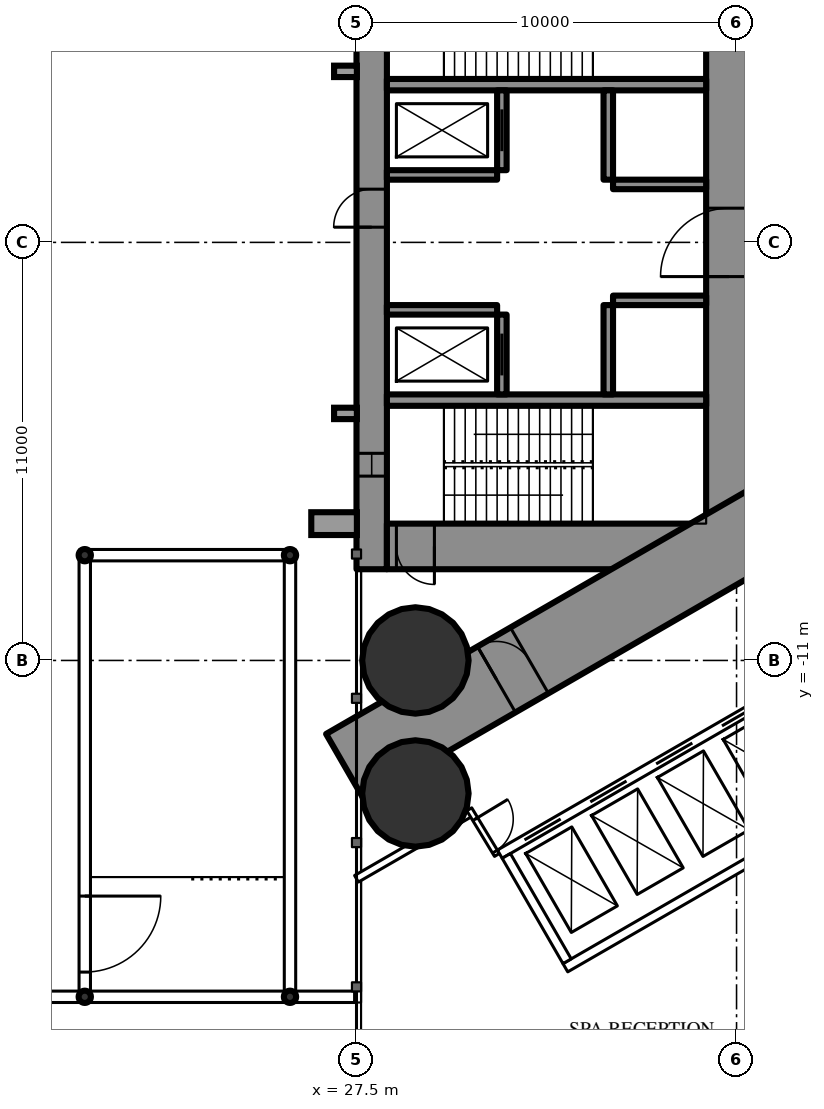
"""IFC4 building model, lengths in metres.
Left out: names, types, materials, properties, quantities, classifications, styles, units other than length and angle.
Written with IfcOpenShell. Run it as: python <this file> out.ifc"""

import sys

from ifc_helpers import new_model, si_unit, direction, frame, frame_2d, origin, origin_2d, place, context, subcontext, project, spatial, rectangle, hollow_circle, extrude, element, fill, save


model = new_model("IFC4")
c1 = context("Model", 3, precision=1e-05, world=origin(), true_north=direction((0.0, 1.0)))
c2 = subcontext(c1, "Body", "Model", "MODEL_VIEW")
j1 = project(units=[si_unit("LENGTHUNIT", "METRE"), si_unit("PLANEANGLEUNIT", "RADIAN")], contexts=[c1])
p1 = place(None, origin())
s1 = spatial("IfcSite", under=j1, at=p1, CompositionType="ELEMENT")
p2 = place(p1, origin())
s2 = spatial("IfcBuilding", under=s1, at=p2, CompositionType="ELEMENT")
p3 = place(p2, frame((0.0, 0.0, 12.6)))
s3 = spatial("IfcBuildingStorey", under=s2, at=p3, CompositionType="ELEMENT", Elevation=12.6)
for number, where, z_axis, x_axis in (
    (1, (29.05, -11.0, 0.0), (0.0, 0.0, 1.0), (1.0, 0.0, 0.0)),
    (2, (29.05, -14.5, 0.0), (0.0, 0.0, 1.0), (1.0, 0.0, 0.0)),
):
    element("IfcColumn", number, at=place(p3, frame(where, z_axis=z_axis, x_axis=x_axis)), inside=s3, PredefinedType="COLUMN", context=c2, shape_type="SweptSolid", body=[
        extrude(hollow_circle(Radius=1.4, WallThickness=0.12, at=origin_2d()), origin(), (0.0, 0.0, 1.0), 5.4),
    ])
p4 = place(p3, frame((27.9, -8.6, 0.0), z_axis=(0.0, 0.0, 1.0), x_axis=(0.0, 1.0, 0.0)))
e3 = element("IfcWall", 3, at=p4, inside=s3, PredefinedType="SHEAR", context=c2, shape_type="SweptSolid", body=[
    extrude(rectangle(XDim=17.2, YDim=0.8, at=frame_2d((8.6, 0.0))), origin(), (0.0, 0.0, 1.0), 5.4),
])
p5 = place(p4, frame((9.0, 0.0, 0.0)))
e4 = element("IfcOpeningElement", 4, at=p5, cuts=e3, PredefinedType="OPENING", context=c2, shape_type="SweptSolid", body=[
    extrude(rectangle(XDim=1.0, YDim=2.2, at=frame_2d((0.5, 1.1))), frame((0.0, 0.41, 0.0), z_axis=(0.0, -1.0, 0.0), x_axis=(1.0, 0.0, 0.0)), (0.0, 0.0, 1.0), 0.82),
])
p6 = place(p4, frame((2.45, 0.0, 0.6)))
e5 = element("IfcOpeningElement", 5, at=p6, cuts=e3, PredefinedType="OPENING", context=c2, shape_type="SweptSolid", body=[
    extrude(rectangle(XDim=0.6, YDim=3.9, at=frame_2d((0.3, 1.95))), frame((0.0, 0.41, 0.0), z_axis=(0.0, -1.0, 0.0), x_axis=(1.0, 0.0, 0.0)), (0.0, 0.0, 1.0), 0.82),
])
p7 = place(p4, frame((14.15, 0.0, 0.6)))
e6 = element("IfcOpeningElement", 6, at=p7, cuts=e3, PredefinedType="OPENING", context=c2, shape_type="SweptSolid", body=[
    extrude(rectangle(XDim=0.6, YDim=3.9, at=frame_2d((0.3, 1.95))), frame((0.0, 0.41, 0.0), z_axis=(0.0, -1.0, 0.0), x_axis=(1.0, 0.0, 0.0)), (0.0, 0.0, 1.0), 0.82),
])
p8 = place(p3, frame((37.3, -8.6, 0.0), z_axis=(0.0, 0.0, 1.0), x_axis=(0.0, 1.0, 0.0)))
e7 = element("IfcWall", 7, at=p8, inside=s3, PredefinedType="SHEAR", context=c2, shape_type="SweptSolid", body=[
    extrude(rectangle(XDim=17.2, YDim=1.2, at=frame_2d((8.6, 0.0))), origin(), (0.0, 0.0, 1.0), 5.4),
])
p9 = place(p8, frame((7.7, 0.0, 0.0)))
e8 = element("IfcOpeningElement", 8, at=p9, cuts=e7, PredefinedType="OPENING", context=c2, shape_type="SweptSolid", body=[
    extrude(rectangle(XDim=1.8, YDim=2.2, at=frame_2d((0.9, 1.1))), frame((0.0, 0.61, 0.0), z_axis=(0.0, -1.0, 0.0), x_axis=(1.0, 0.0, 0.0)), (0.0, 0.0, 1.0), 1.22),
])
p10 = place(p3, frame((28.3, -8.0, 0.0), z_axis=(0.0, 0.0, 1.0), x_axis=(1.0, 0.0, 0.0)))
e9 = element("IfcWall", 9, at=p10, inside=s3, PredefinedType="SHEAR", context=c2, shape_type="SweptSolid", body=[
    extrude(rectangle(XDim=8.4, YDim=1.2, at=frame_2d((4.2, 0.0))), origin(), (0.0, 0.0, 1.0), 5.4),
])
p11 = place(p10, frame((0.25, 0.0, 0.0)))
e10 = element("IfcOpeningElement", 10, at=p11, cuts=e9, PredefinedType="OPENING", context=c2, shape_type="SweptSolid", body=[
    extrude(rectangle(XDim=1.0, YDim=2.2, at=frame_2d((0.5, 1.1))), frame((0.0, 0.61, 0.0), z_axis=(0.0, -1.0, 0.0), x_axis=(1.0, 0.0, 0.0)), (0.0, 0.0, 1.0), 1.22),
])
for number, where, z_axis, x_axis in (
    (11, (28.3, -4.15, 0.0), (0.0, 0.0, 1.0), (1.0, 0.0, 0.0)),
    (12, (28.3, 4.15, 0.0), (0.0, 0.0, 1.0), (1.0, 0.0, 0.0)),
):
    element("IfcWall", number, at=place(p3, frame(where, z_axis=z_axis, x_axis=x_axis)), inside=s3, PredefinedType="SHEAR", context=c2, shape_type="SweptSolid", body=[
        extrude(rectangle(XDim=8.4, YDim=0.3, at=frame_2d((4.2, 0.0))), origin(), (0.0, 0.0, 1.0), 5.4),
    ])
p12 = place(p3, frame((31.325, -4.0, 0.0), z_axis=(0.0, 0.0, 1.0), x_axis=(0.0, 1.0, 0.0)))
e13 = element("IfcWall", 13, at=p12, inside=s3, PredefinedType="SHEAR", context=c2, shape_type="SweptSolid", body=[
    extrude(rectangle(XDim=2.1, YDim=0.25, at=frame_2d((1.05, 0.0))), origin(), (0.0, 0.0, 1.0), 5.4),
])
p13 = place(p12, frame((0.5, 0.0, 0.0)))
e14 = element("IfcOpeningElement", 14, at=p13, cuts=e13, PredefinedType="OPENING", context=c2, shape_type="SweptSolid", body=[
    extrude(rectangle(XDim=1.1, YDim=2.2, at=frame_2d((0.55, 1.1))), frame((0.0, 0.135, 0.0), z_axis=(0.0, -1.0, 0.0), x_axis=(1.0, 0.0, 0.0)), (0.0, 0.0, 1.0), 0.27),
])
p14 = place(p3, frame((34.125, -4.0, 0.0), z_axis=(0.0, 0.0, 1.0), x_axis=(0.0, 1.0, 0.0)))
e15 = element("IfcWall", 15, at=p14, inside=s3, PredefinedType="SHEAR", context=c2, shape_type="SweptSolid", body=[
    extrude(rectangle(XDim=2.35, YDim=0.25, at=frame_2d((1.175, 0.0))), origin(), (0.0, 0.0, 1.0), 5.4),
])
p15 = place(p3, frame((28.3, -1.775, 0.0), z_axis=(0.0, 0.0, 1.0), x_axis=(1.0, 0.0, 0.0)))
e16 = element("IfcWall", 16, at=p15, inside=s3, PredefinedType="SHEAR", context=c2, shape_type="SweptSolid", body=[
    extrude(rectangle(XDim=2.9, YDim=0.25, at=frame_2d((1.45, 0.0))), origin(), (0.0, 0.0, 1.0), 5.4),
])
p16 = place(p3, frame((34.25, -1.525, 0.0), z_axis=(0.0, 0.0, 1.0), x_axis=(1.0, 0.0, 0.0)))
e17 = element("IfcWall", 17, at=p16, inside=s3, PredefinedType="SHEAR", context=c2, shape_type="SweptSolid", body=[
    extrude(rectangle(XDim=2.45, YDim=0.25, at=frame_2d((1.225, 0.0))), origin(), (0.0, 0.0, 1.0), 5.4),
])
p17 = place(p3, frame((31.325, 1.9, 0.0), z_axis=(0.0, 0.0, 1.0), x_axis=(0.0, 1.0, 0.0)))
e18 = element("IfcWall", 18, at=p17, inside=s3, PredefinedType="SHEAR", context=c2, shape_type="SweptSolid", body=[
    extrude(rectangle(XDim=2.1, YDim=0.25, at=frame_2d((1.05, 0.0))), origin(), (0.0, 0.0, 1.0), 5.4),
])
p18 = place(p17, frame((0.5, 0.0, 0.0)))
e19 = element("IfcOpeningElement", 19, at=p18, cuts=e18, PredefinedType="OPENING", context=c2, shape_type="SweptSolid", body=[
    extrude(rectangle(XDim=1.1, YDim=2.2, at=frame_2d((0.55, 1.1))), frame((0.0, 0.135, 0.0), z_axis=(0.0, -1.0, 0.0), x_axis=(1.0, 0.0, 0.0)), (0.0, 0.0, 1.0), 0.27),
])
p19 = place(p3, frame((34.125, 1.65, 0.0), z_axis=(0.0, 0.0, 1.0), x_axis=(0.0, 1.0, 0.0)))
e20 = element("IfcWall", 20, at=p19, inside=s3, PredefinedType="SHEAR", context=c2, shape_type="SweptSolid", body=[
    extrude(rectangle(XDim=2.35, YDim=0.25, at=frame_2d((1.175, 0.0))), origin(), (0.0, 0.0, 1.0), 5.4),
])
p20 = place(p3, frame((28.3, 1.775, 0.0), z_axis=(0.0, 0.0, 1.0), x_axis=(1.0, 0.0, 0.0)))
e21 = element("IfcWall", 21, at=p20, inside=s3, PredefinedType="SHEAR", context=c2, shape_type="SweptSolid", body=[
    extrude(rectangle(XDim=2.9, YDim=0.25, at=frame_2d((1.45, 0.0))), origin(), (0.0, 0.0, 1.0), 5.4),
])
p21 = place(p3, frame((34.25, 1.525, 0.0), z_axis=(0.0, 0.0, 1.0), x_axis=(1.0, 0.0, 0.0)))
e22 = element("IfcWall", 22, at=p21, inside=s3, PredefinedType="SHEAR", context=c2, shape_type="SweptSolid", body=[
    extrude(rectangle(XDim=2.45, YDim=0.25, at=frame_2d((1.225, 0.0))), origin(), (0.0, 0.0, 1.0), 5.4),
])
p22 = place(p3, frame((27.2, -13.8, 0.0), z_axis=(0.0, 0.0, 1.0), x_axis=(0.866027159892, 0.499996958321, 0.0)))
e23 = element("IfcWall", 23, at=p22, inside=s3, PredefinedType="SHEAR", context=c2, shape_type="SweptSolid", body=[
    extrude(rectangle(XDim=27.947, YDim=2.0, at=frame_2d((13.973, 0.0))), origin(), (0.0, 0.0, 1.0), 5.4),
])
p23 = place(p22, frame((4.6, 0.0, 0.0)))
e24 = element("IfcOpeningElement", 24, at=p23, cuts=e23, PredefinedType="OPENING", context=c2, shape_type="SweptSolid", body=[
    extrude(rectangle(XDim=1.0, YDim=2.2, at=frame_2d((0.5, 1.1))), frame((0.0, 1.01, 0.0), z_axis=(0.0, -1.0, 0.0), x_axis=(1.0, 0.0, 0.0)), (0.0, 0.0, 1.0), 2.02),
])
p24 = place(p22, frame((13.395, 0.0, 0.0)))
e25 = element("IfcOpeningElement", 25, at=p24, cuts=e23, PredefinedType="OPENING", context=c2, shape_type="SweptSolid", body=[
    extrude(rectangle(XDim=1.8, YDim=2.2, at=frame_2d((0.9, 1.1))), frame((0.0, 1.01, 0.0), z_axis=(0.0, -1.0, 0.0), x_axis=(1.0, 0.0, 0.0)), (0.0, 0.0, 1.0), 2.02),
])
p25 = place(p3, frame((27.2, 13.8, 0.0), z_axis=(0.0, 0.0, 1.0), x_axis=(0.866024545924, -0.500001485854, 0.0)))
e26 = element("IfcWall", 26, at=p25, inside=s3, PredefinedType="SHEAR", context=c2, shape_type="SweptSolid", body=[
    extrude(rectangle(XDim=26.534, YDim=2.0, at=frame_2d((13.267, 0.0))), origin(), (0.0, 0.0, 1.0), 5.4),
])
p26 = place(p25, frame((4.6, 0.0, 0.0)))
e27 = element("IfcOpeningElement", 27, at=p26, cuts=e26, PredefinedType="OPENING", context=c2, shape_type="SweptSolid", body=[
    extrude(rectangle(XDim=1.0, YDim=2.2, at=frame_2d((0.5, 1.1))), frame((0.0, 1.01, 0.0), z_axis=(0.0, -1.0, 0.0), x_axis=(1.0, 0.0, 0.0)), (0.0, 0.0, 1.0), 2.02),
])
p27 = place(p25, frame((13.395, 0.0, 0.0)))
e28 = element("IfcOpeningElement", 28, at=p27, cuts=e26, PredefinedType="OPENING", context=c2, shape_type="SweptSolid", body=[
    extrude(rectangle(XDim=1.8, YDim=2.2, at=frame_2d((0.9, 1.1))), frame((0.0, 1.01, 0.0), z_axis=(0.0, -1.0, 0.0), x_axis=(1.0, 0.0, 0.0)), (0.0, 0.0, 1.0), 2.02),
])
p28 = place(p3, frame((-20.2, -19.85, 0.0), z_axis=(0.0, 0.0, 1.0), x_axis=(1.0, 0.0, 0.0)))
e29 = element("IfcWall", 29, at=p28, inside=s3, PredefinedType="PARAPET", context=c2, shape_type="SweptSolid", body=[
    extrude(rectangle(XDim=40.4, YDim=0.3, at=frame_2d((20.2, 0.0))), origin(), (0.0, 0.0, 1.0), 1.1),
])
p29 = place(p3, frame((25.9, -19.85, 0.0), z_axis=(0.0, 0.0, 1.0), x_axis=(1.0, 0.0, 0.0)))
e30 = element("IfcWall", 30, at=p29, inside=s3, PredefinedType="PARAPET", context=c2, shape_type="SweptSolid", body=[
    extrude(rectangle(XDim=1.55, YDim=0.3, at=frame_2d((0.775, 0.0))), origin(), (0.0, 0.0, 1.0), 1.1),
])
p30 = place(p3, frame((27.5, -16.744, 0.0), z_axis=(0.0, 0.0, 1.0), x_axis=(0.866034395887, 0.499984424899, 0.0)))
e31 = element("IfcWall", 31, at=p30, inside=s3, PredefinedType="PARTITIONING", context=c2, shape_type="SweptSolid", body=[
    extrude(rectangle(XDim=3.469, YDim=0.2, at=frame_2d((1.734, 0.0))), origin(), (0.0, 0.0, 1.0), 4.25),
])
p31 = place(p3, frame((37.034, 11.24, 0.0), z_axis=(0.0, 0.0, 1.0), x_axis=(0.866025942536, -0.499999066854, 0.0)))
e32 = element("IfcWall", 32, at=p31, inside=s3, PredefinedType="PARTITIONING", context=c2, shape_type="SweptSolid", body=[
    extrude(rectangle(XDim=22.36, YDim=0.2, at=frame_2d((11.18, 0.0))), origin(), (0.0, 0.0, 1.0), 4.25),
])
p32 = place(p31, frame((19.423, 0.0, 0.0)))
e33 = element("IfcOpeningElement", 33, at=p32, cuts=e32, PredefinedType="OPENING", context=c2, shape_type="SweptSolid", body=[
    extrude(rectangle(XDim=1.8, YDim=2.2, at=frame_2d((0.9, 1.1))), frame((0.0, 0.11, 0.0), z_axis=(0.0, -1.0, 0.0), x_axis=(1.0, 0.0, 0.0)), (0.0, 0.0, 1.0), 0.22),
])
p33 = place(p31, frame((13.274, 0.0, 0.0)))
e34 = element("IfcOpeningElement", 34, at=p33, cuts=e32, PredefinedType="OPENING", context=c2, shape_type="SweptSolid", body=[
    extrude(rectangle(XDim=1.8, YDim=2.2, at=frame_2d((0.9, 1.1))), frame((0.0, 0.11, 0.0), z_axis=(0.0, -1.0, 0.0), x_axis=(1.0, 0.0, 0.0)), (0.0, 0.0, 1.0), 0.22),
])
p34 = place(p31, frame((4.602, 0.0, 0.0)))
e35 = element("IfcOpeningElement", 35, at=p34, cuts=e32, PredefinedType="OPENING", context=c2, shape_type="SweptSolid", body=[
    extrude(rectangle(XDim=1.8, YDim=2.2, at=frame_2d((0.9, 1.1))), frame((0.0, 0.11, 0.0), z_axis=(0.0, -1.0, 0.0), x_axis=(1.0, 0.0, 0.0)), (0.0, 0.0, 1.0), 0.22),
])
p35 = place(p3, frame((30.467, -14.916, 0.0), z_axis=(0.0, 0.0, 1.0), x_axis=(0.518297865337, -0.855200165334, 0.0)))
e36 = element("IfcWall", 36, at=p35, inside=s3, PredefinedType="PARTITIONING", context=c2, shape_type="SweptSolid", body=[
    extrude(rectangle(XDim=1.405, YDim=0.15, at=frame_2d((0.703, 0.0))), origin(), (0.0, 0.0, 1.0), 5.15),
])
p36 = place(p35, frame((0.303, 0.0, 0.0)))
e37 = element("IfcOpeningElement", 37, at=p36, cuts=e36, PredefinedType="OPENING", context=c2, shape_type="SweptSolid", body=[
    extrude(rectangle(XDim=1.0, YDim=2.2, at=frame_2d((0.5, 1.1))), frame((0.0, 0.085, 0.0), z_axis=(0.0, -1.0, 0.0), x_axis=(1.0, 0.0, 0.0)), (0.0, 0.0, 1.0), 0.17),
])
p37 = place(p3, frame((31.271, -16.097, 0.0), z_axis=(0.0, 0.0, 1.0), x_axis=(0.86604045752, 0.499973925258, 0.0)))
e38 = element("IfcWall", 38, at=p37, inside=s3, PredefinedType="PARTITIONING", context=c2, shape_type="SweptSolid", body=[
    extrude(rectangle(XDim=8.6, YDim=0.25, at=frame_2d((4.3, 0.0))), origin(), (0.0, 0.0, 1.0), 5.15),
])
p38 = place(p37, frame((0.75, 0.0, 0.0)))
e39 = element("IfcOpeningElement", 39, at=p38, cuts=e38, PredefinedType="OPENING", context=c2, shape_type="SweptSolid", body=[
    extrude(rectangle(XDim=1.1, YDim=2.2, at=frame_2d((0.55, 1.1))), frame((0.0, 0.135, 0.0), z_axis=(0.0, -1.0, 0.0), x_axis=(1.0, 0.0, 0.0)), (0.0, 0.0, 1.0), 0.27),
])
p39 = place(p37, frame((2.75, 0.0, 0.0)))
e40 = element("IfcOpeningElement", 40, at=p39, cuts=e38, PredefinedType="OPENING", context=c2, shape_type="SweptSolid", body=[
    extrude(rectangle(XDim=1.1, YDim=2.2, at=frame_2d((0.55, 1.1))), frame((0.0, 0.135, 0.0), z_axis=(0.0, -1.0, 0.0), x_axis=(1.0, 0.0, 0.0)), (0.0, 0.0, 1.0), 0.27),
])
p40 = place(p37, frame((4.75, 0.0, 0.0)))
e41 = element("IfcOpeningElement", 41, at=p40, cuts=e38, PredefinedType="OPENING", context=c2, shape_type="SweptSolid", body=[
    extrude(rectangle(XDim=1.1, YDim=2.2, at=frame_2d((0.55, 1.1))), frame((0.0, 0.135, 0.0), z_axis=(0.0, -1.0, 0.0), x_axis=(1.0, 0.0, 0.0)), (0.0, 0.0, 1.0), 0.27),
])
p41 = place(p37, frame((6.75, 0.0, 0.0)))
e42 = element("IfcOpeningElement", 42, at=p41, cuts=e38, PredefinedType="OPENING", context=c2, shape_type="SweptSolid", body=[
    extrude(rectangle(XDim=1.1, YDim=2.2, at=frame_2d((0.55, 1.1))), frame((0.0, 0.135, 0.0), z_axis=(0.0, -1.0, 0.0), x_axis=(1.0, 0.0, 0.0)), (0.0, 0.0, 1.0), 0.27),
])
p42 = place(p3, frame((32.996, -19.086, 0.0), z_axis=(0.0, 0.0, 1.0), x_axis=(0.866028165386, 0.499995216735, 0.0)))
e43 = element("IfcWall", 43, at=p42, inside=s3, PredefinedType="PARTITIONING", context=c2, shape_type="SweptSolid", body=[
    extrude(rectangle(XDim=8.6, YDim=0.25, at=frame_2d((4.3, 0.0))), origin(), (0.0, 0.0, 1.0), 5.15),
])
p43 = place(p3, frame((31.441, -16.143, 0.0), z_axis=(0.0, 0.0, 1.0), x_axis=(0.499929347863, -0.866066190972, 0.0)))
e44 = element("IfcWall", 44, at=p43, inside=s3, PredefinedType="PARTITIONING", context=c2, shape_type="SweptSolid", body=[
    extrude(rectangle(XDim=3.201, YDim=0.25, at=frame_2d((1.6, 0.0))), origin(), (0.0, 0.0, 1.0), 5.15),
])
for number, where, z_axis, x_axis in (
    (45, (20.35, -8.23, 0.0), (0.0, 0.0, 1.0), (1.0, 0.0, 0.0)),
    (46, (25.75, -8.23, 0.0), (0.0, 0.0, 1.0), (1.0, 0.0, 0.0)),
    (47, (20.35, -19.85, 0.0), (0.0, 0.0, 1.0), (1.0, 0.0, 0.0)),
    (48, (25.75, -19.85, 0.0), (0.0, 0.0, 1.0), (1.0, 0.0, 0.0)),
):
    element("IfcColumn", number, at=place(p3, frame(where, z_axis=z_axis, x_axis=x_axis)), inside=s3, PredefinedType="COLUMN", context=c2, shape_type="SweptSolid", body=[
        extrude(hollow_circle(Radius=0.162, WallThickness=0.012, at=origin_2d()), origin(), (0.0, 0.0, 1.0), 3.0),
    ])
for number, where, z_axis, x_axis in (
    (49, (20.411, -19.85, 0.0), (0.0, 0.0, 1.0), (1.0, 0.0, 0.0)),
    (50, (20.411, -8.23, 0.0), (0.0, 0.0, 1.0), (1.0, 0.0, 0.0)),
):
    element("IfcWall", number, at=place(p3, frame(where, z_axis=z_axis, x_axis=x_axis)), inside=s3, PredefinedType="SOLIDWALL", context=c2, shape_type="SweptSolid", body=[
        extrude(rectangle(XDim=5.278, YDim=0.3, at=frame_2d((2.639, 0.0))), origin(), (0.0, 0.0, 1.0), 2.23),
    ])
p44 = place(p3, frame((20.35, -8.291, 0.0), z_axis=(0.0, 0.0, 1.0), x_axis=(0.0, -1.0, 0.0)))
e51 = element("IfcWall", 51, at=p44, inside=s3, PredefinedType="SOLIDWALL", context=c2, shape_type="SweptSolid", body=[
    extrude(rectangle(XDim=11.498, YDim=0.3, at=frame_2d((5.749, 0.0))), origin(), (0.0, 0.0, 1.0), 2.23),
])
p45 = place(p44, frame((8.909, 0.0, 0.0)))
e52 = element("IfcOpeningElement", 52, at=p45, cuts=e51, PredefinedType="OPENING", context=c2, shape_type="SweptSolid", body=[
    extrude(rectangle(XDim=2.0, YDim=2.2, at=frame_2d((1.0, 1.1))), frame((0.0, 0.16, 0.0), z_axis=(0.0, -1.0, 0.0), x_axis=(1.0, 0.0, 0.0)), (0.0, 0.0, 1.0), 0.32),
])
p46 = place(p3, frame((25.75, -8.291, 0.0), z_axis=(0.0, 0.0, 1.0), x_axis=(0.0, -1.0, 0.0)))
e53 = element("IfcWall", 53, at=p46, inside=s3, PredefinedType="SOLIDWALL", context=c2, shape_type="SweptSolid", body=[
    extrude(rectangle(XDim=11.498, YDim=0.3, at=frame_2d((5.749, 0.0))), origin(), (0.0, 0.0, 1.0), 2.23),
])
p47 = place(p36, origin())
e54 = element("IfcDoor", 54, at=p47, inside=s3, OperationType="SINGLE_SWING_LEFT", PredefinedType="DOOR", context=c2, shape_type="SweptSolid", body=[
    extrude(rectangle(XDim=1.0, YDim=2.2, at=frame_2d((0.5, 1.1))), frame((0.0, 0.025, 0.0), z_axis=(0.0, -1.0, 0.0), x_axis=(1.0, 0.0, 0.0)), (0.0, 0.0, 1.0), 0.05),
])
fill(e37, e54)
p48 = place(p23, origin())
e55 = element("IfcDoor", 55, at=p48, inside=s3, OperationType="SINGLE_SWING_LEFT", PredefinedType="DOOR", context=c2, shape_type="SweptSolid", body=[
    extrude(rectangle(XDim=1.0, YDim=2.2, at=frame_2d((0.5, 1.1))), frame((0.0, 0.025, 0.0), z_axis=(0.0, -1.0, 0.0), x_axis=(1.0, 0.0, 0.0)), (0.0, 0.0, 1.0), 0.05),
])
fill(e24, e55)
p49 = place(p9, origin())
e56 = element("IfcDoor", 56, at=p49, inside=s3, OperationType="DOUBLE_DOOR_SINGLE_SWING", PredefinedType="DOOR", context=c2, shape_type="SweptSolid", body=[
    extrude(rectangle(XDim=1.8, YDim=2.2, at=frame_2d((0.9, 1.1))), frame((0.0, 0.025, 0.0), z_axis=(0.0, -1.0, 0.0), x_axis=(1.0, 0.0, 0.0)), (0.0, 0.0, 1.0), 0.05),
])
fill(e8, e56)
p50 = place(p11, origin())
e57 = element("IfcDoor", 57, at=p50, inside=s3, OperationType="SINGLE_SWING_RIGHT", PredefinedType="DOOR", context=c2, shape_type="SweptSolid", body=[
    extrude(rectangle(XDim=1.0, YDim=2.2, at=frame_2d((0.5, 1.1))), frame((0.0, 0.025, 0.0), z_axis=(0.0, -1.0, 0.0), x_axis=(1.0, 0.0, 0.0)), (0.0, 0.0, 1.0), 0.05),
])
fill(e10, e57)
p51 = place(p5, origin())
e58 = element("IfcDoor", 58, at=p51, inside=s3, OperationType="SINGLE_SWING_LEFT", PredefinedType="DOOR", context=c2, shape_type="SweptSolid", body=[
    extrude(rectangle(XDim=1.0, YDim=2.2, at=frame_2d((0.5, 1.1))), frame((0.0, 0.025, 0.0), z_axis=(0.0, -1.0, 0.0), x_axis=(1.0, 0.0, 0.0)), (0.0, 0.0, 1.0), 0.05),
])
fill(e4, e58)
p52 = place(p13, origin())
e59 = element("IfcDoor", 59, at=p52, inside=s3, OperationType="SLIDING_TO_LEFT", PredefinedType="USERDEFINED", context=c2, shape_type="SweptSolid", body=[
    extrude(rectangle(XDim=1.1, YDim=2.2, at=frame_2d((0.55, 1.1))), frame((0.0, 0.025, 0.0), z_axis=(0.0, -1.0, 0.0), x_axis=(1.0, 0.0, 0.0)), (0.0, 0.0, 1.0), 0.05),
])
fill(e14, e59)
p53 = place(p18, origin())
e60 = element("IfcDoor", 60, at=p53, inside=s3, OperationType="SLIDING_TO_LEFT", PredefinedType="USERDEFINED", context=c2, shape_type="SweptSolid", body=[
    extrude(rectangle(XDim=1.1, YDim=2.2, at=frame_2d((0.55, 1.1))), frame((0.0, 0.025, 0.0), z_axis=(0.0, -1.0, 0.0), x_axis=(1.0, 0.0, 0.0)), (0.0, 0.0, 1.0), 0.05),
])
fill(e19, e60)
p54 = place(p38, origin())
e61 = element("IfcDoor", 61, at=p54, inside=s3, OperationType="DOUBLE_DOOR_SLIDING", PredefinedType="USERDEFINED", context=c2, shape_type="SweptSolid", body=[
    extrude(rectangle(XDim=1.1, YDim=2.2, at=frame_2d((0.55, 1.1))), frame((0.0, 0.025, 0.0), z_axis=(0.0, -1.0, 0.0), x_axis=(1.0, 0.0, 0.0)), (0.0, 0.0, 1.0), 0.05),
])
fill(e39, e61)
p55 = place(p39, origin())
e62 = element("IfcDoor", 62, at=p55, inside=s3, OperationType="DOUBLE_DOOR_SLIDING", PredefinedType="USERDEFINED", context=c2, shape_type="SweptSolid", body=[
    extrude(rectangle(XDim=1.1, YDim=2.2, at=frame_2d((0.55, 1.1))), frame((0.0, 0.025, 0.0), z_axis=(0.0, -1.0, 0.0), x_axis=(1.0, 0.0, 0.0)), (0.0, 0.0, 1.0), 0.05),
])
fill(e40, e62)
p56 = place(p40, origin())
e63 = element("IfcDoor", 63, at=p56, inside=s3, OperationType="DOUBLE_DOOR_SLIDING", PredefinedType="USERDEFINED", context=c2, shape_type="SweptSolid", body=[
    extrude(rectangle(XDim=1.1, YDim=2.2, at=frame_2d((0.55, 1.1))), frame((0.0, 0.025, 0.0), z_axis=(0.0, -1.0, 0.0), x_axis=(1.0, 0.0, 0.0)), (0.0, 0.0, 1.0), 0.05),
])
fill(e41, e63)
p57 = place(p41, origin())
e64 = element("IfcDoor", 64, at=p57, inside=s3, OperationType="DOUBLE_DOOR_SLIDING", PredefinedType="USERDEFINED", context=c2, shape_type="SweptSolid", body=[
    extrude(rectangle(XDim=1.1, YDim=2.2, at=frame_2d((0.55, 1.1))), frame((0.0, 0.025, 0.0), z_axis=(0.0, -1.0, 0.0), x_axis=(1.0, 0.0, 0.0)), (0.0, 0.0, 1.0), 0.05),
])
fill(e42, e64)
p58 = place(p45, origin())
e65 = element("IfcDoor", 65, at=p58, inside=s3, OperationType="DOUBLE_DOOR_SINGLE_SWING", PredefinedType="DOOR", context=c2, shape_type="SweptSolid", body=[
    extrude(rectangle(XDim=2.0, YDim=2.2, at=frame_2d((1.0, 1.1))), frame((0.0, 0.025, 0.0), z_axis=(0.0, -1.0, 0.0), x_axis=(1.0, 0.0, 0.0)), (0.0, 0.0, 1.0), 0.05),
])
fill(e52, e65)
p59 = place(p6, origin())
e66 = element("IfcWindow", 66, at=p59, inside=s3, PartitioningType="SINGLE_PANEL", PredefinedType="WINDOW", context=c2, shape_type="SweptSolid", body=[
    extrude(rectangle(XDim=0.6, YDim=3.9, at=frame_2d((0.3, 1.95))), frame((0.0, 0.03, 0.0), z_axis=(0.0, -1.0, 0.0), x_axis=(1.0, 0.0, 0.0)), (0.0, 0.0, 1.0), 0.06),
])
fill(e5, e66)
save(model, sys.argv[1])
